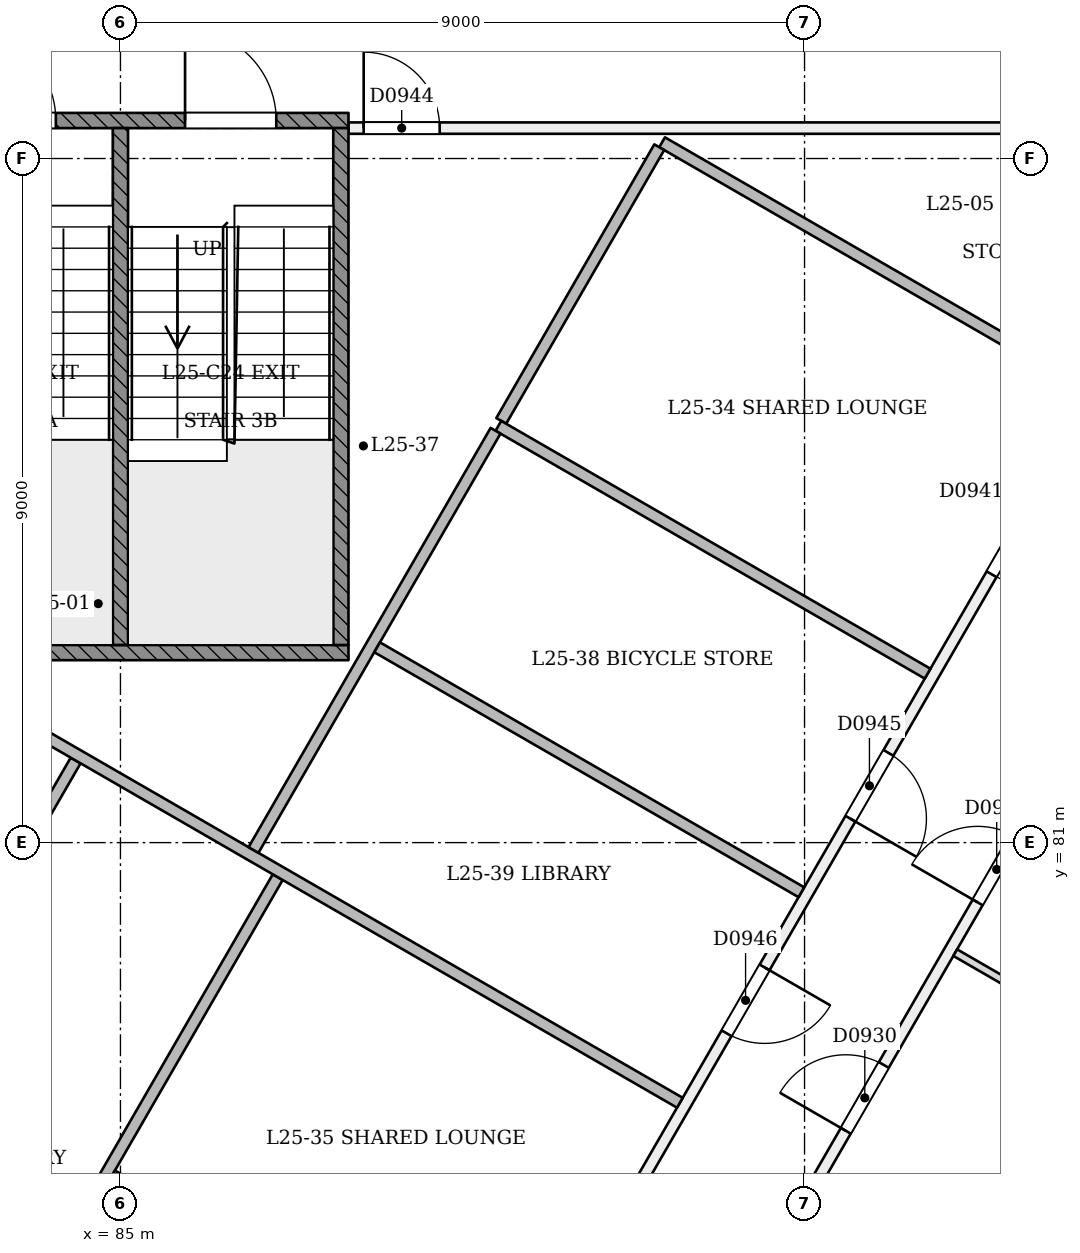
"""IFC4 building model, lengths in metres.
Left out: names, types, materials, properties, quantities, classifications, styles, units other than length and angle.
Written with IfcOpenShell. Run it as: python <this file> out.ifc"""

import sys

from ifc_helpers import new_model, si_unit, direction, frame, frame_2d, origin, place, context, subcontext, project, spatial, rectangle, extrude, element, fill, save


model = new_model("IFC4")
c1 = context("Model", 3, precision=1e-05, world=origin(), true_north=direction((0.0, 1.0)))
c2 = subcontext(c1, "Body", "Model", "MODEL_VIEW")
j1 = project(units=[si_unit("LENGTHUNIT", "METRE"), si_unit("PLANEANGLEUNIT", "RADIAN")], contexts=[c1])
p1 = place(None, origin())
s1 = spatial("IfcSite", under=j1, at=p1, CompositionType="ELEMENT")
p2 = place(p1, origin())
s2 = spatial("IfcBuilding", under=s1, at=p2, CompositionType="ELEMENT")
p3 = place(p2, frame((0.0, 0.0, 100.8)))
s3 = spatial("IfcBuildingStorey", under=s2, at=p3, CompositionType="ELEMENT", Elevation=100.8)
p4 = place(p3, frame((84.935, 64.793, 0.0), z_axis=(0.0, 0.0, 1.0), x_axis=(-0.500000245635, 0.866025261967, 0.0)))
e1 = element("IfcWall", 1, at=p4, inside=s3, PredefinedType="PARTITIONING", context=c2, shape_type="SweptSolid", body=[
    extrude(rectangle(XDim=29.568, YDim=0.15, at=frame_2d((14.784, 0.0))), origin(), (0.0, 0.0, 1.0), 3.1),
])
p5 = place(p4, frame((26.417, 0.0, 0.0)))
e2 = element("IfcOpeningElement", 2, at=p5, cuts=e1, PredefinedType="OPENING", context=c2, shape_type="SweptSolid", body=[
    extrude(rectangle(XDim=0.9, YDim=2.1, at=frame_2d((0.45, 1.05))), frame((0.0, 0.085, 0.0), z_axis=(0.0, -1.0, 0.0), x_axis=(1.0, 0.0, 0.0)), (0.0, 0.0, 1.0), 0.171),
])
p6 = place(p4, frame((5.658, 0.0, 0.0)))
e3 = element("IfcOpeningElement", 3, at=p6, cuts=e1, PredefinedType="OPENING", context=c2, shape_type="SweptSolid", body=[
    extrude(rectangle(XDim=1.0, YDim=2.1, at=frame_2d((0.5, 1.05))), frame((0.0, 0.085, 0.0), z_axis=(0.0, -1.0, 0.0), x_axis=(1.0, 0.0, 0.0)), (0.0, 0.0, 1.0), 0.171),
])
p7 = place(p4, frame((9.394, 0.0, 0.0)))
e4 = element("IfcOpeningElement", 4, at=p7, cuts=e1, PredefinedType="OPENING", context=c2, shape_type="SweptSolid", body=[
    extrude(rectangle(XDim=1.0, YDim=2.1, at=frame_2d((0.5, 1.05))), frame((0.0, 0.085, 0.0), z_axis=(0.0, -1.0, 0.0), x_axis=(1.0, 0.0, 0.0)), (0.0, 0.0, 1.0), 0.171),
])
p8 = place(p4, frame((17.694, 0.0, 0.0)))
e5 = element("IfcOpeningElement", 5, at=p8, cuts=e1, PredefinedType="OPENING", context=c2, shape_type="SweptSolid", body=[
    extrude(rectangle(XDim=1.0, YDim=2.1, at=frame_2d((0.5, 1.05))), frame((0.0, 0.085, 0.0), z_axis=(0.0, -1.0, 0.0), x_axis=(1.0, 0.0, 0.0)), (0.0, 0.0, 1.0), 0.171),
])
p9 = place(p4, frame((12.884, 0.0, 0.0)))
e6 = element("IfcOpeningElement", 6, at=p9, cuts=e1, PredefinedType="OPENING", context=c2, shape_type="SweptSolid", body=[
    extrude(rectangle(XDim=1.0, YDim=2.1, at=frame_2d((0.5, 1.05))), frame((0.0, 0.085, 0.0), z_axis=(0.0, -1.0, 0.0), x_axis=(1.0, 0.0, 0.0)), (0.0, 0.0, 1.0), 0.171),
])
p10 = place(p4, frame((22.366, 0.0, 0.0)))
e7 = element("IfcOpeningElement", 7, at=p10, cuts=e1, PredefinedType="OPENING", context=c2, shape_type="SweptSolid", body=[
    extrude(rectangle(XDim=1.0, YDim=2.1, at=frame_2d((0.5, 1.05))), frame((0.0, 0.085, 0.0), z_axis=(0.0, -1.0, 0.0), x_axis=(1.0, 0.0, 0.0)), (0.0, 0.0, 1.0), 0.171),
])
p11 = place(p3, frame((88.0, 90.4, 0.0), z_axis=(0.0, 0.0, 1.0), x_axis=(1.0, 0.0, 0.0)))
e8 = element("IfcWall", 8, at=p11, inside=s3, PredefinedType="PARTITIONING", context=c2, shape_type="SweptSolid", body=[
    extrude(rectangle(XDim=11.719, YDim=0.15, at=frame_2d((5.86, 0.0))), origin(), (0.0, 0.0, 1.0), 3.1),
])
p12 = place(p11, frame((0.2, 0.0, 0.0)))
e9 = element("IfcOpeningElement", 9, at=p12, cuts=e8, PredefinedType="OPENING", context=c2, shape_type="SweptSolid", body=[
    extrude(rectangle(XDim=1.0, YDim=2.1, at=frame_2d((0.5, 1.05))), frame((0.0, 0.085, 0.0), z_axis=(0.0, -1.0, 0.0), x_axis=(1.0, 0.0, 0.0)), (0.0, 0.0, 1.0), 0.171),
])
p13 = place(p3, frame((63.623, 97.706, 0.0), z_axis=(0.0, 0.0, 1.0), x_axis=(0.500000781663, -0.866024952491, 0.0)))
e10 = element("IfcWall", 10, at=p13, inside=s3, PredefinedType="PARTITIONING", context=c2, shape_type="SweptSolid", body=[
    extrude(rectangle(XDim=41.837, YDim=0.15, at=frame_2d((20.919, 0.0))), origin(), (0.0, 0.0, 1.0), 2.7),
])
p14 = place(p13, frame((2.912, 0.0, 0.0)))
e11 = element("IfcOpeningElement", 11, at=p14, cuts=e10, PredefinedType="OPENING", context=c2, shape_type="SweptSolid", body=[
    extrude(rectangle(XDim=1.2, YDim=2.1, at=frame_2d((0.6, 1.05))), frame((0.0, 0.085, 0.0), z_axis=(0.0, -1.0, 0.0), x_axis=(1.0, 0.0, 0.0)), (0.0, 0.0, 1.0), 0.171),
])
p15 = place(p13, frame((10.198, 0.0, 0.0)))
e12 = element("IfcOpeningElement", 12, at=p15, cuts=e10, PredefinedType="OPENING", context=c2, shape_type="SweptSolid", body=[
    extrude(rectangle(XDim=1.0, YDim=2.1, at=frame_2d((0.5, 1.05))), frame((0.0, 0.085, 0.0), z_axis=(0.0, -1.0, 0.0), x_axis=(1.0, 0.0, 0.0)), (0.0, 0.0, 1.0), 0.171),
])
p16 = place(p13, frame((12.523, 0.0, 0.0)))
e13 = element("IfcOpeningElement", 13, at=p16, cuts=e10, PredefinedType="OPENING", context=c2, shape_type="SweptSolid", body=[
    extrude(rectangle(XDim=1.0, YDim=2.1, at=frame_2d((0.5, 1.05))), frame((0.0, 0.085, 0.0), z_axis=(0.0, -1.0, 0.0), x_axis=(1.0, 0.0, 0.0)), (0.0, 0.0, 1.0), 0.171),
])
p17 = place(p13, frame((19.314, 0.0, 0.0)))
e14 = element("IfcOpeningElement", 14, at=p17, cuts=e10, PredefinedType="OPENING", context=c2, shape_type="SweptSolid", body=[
    extrude(rectangle(XDim=1.0, YDim=2.1, at=frame_2d((0.5, 1.05))), frame((0.0, 0.085, 0.0), z_axis=(0.0, -1.0, 0.0), x_axis=(1.0, 0.0, 0.0)), (0.0, 0.0, 1.0), 0.171),
])
p18 = place(p13, frame((21.639, 0.0, 0.0)))
e15 = element("IfcOpeningElement", 15, at=p18, cuts=e10, PredefinedType="OPENING", context=c2, shape_type="SweptSolid", body=[
    extrude(rectangle(XDim=1.0, YDim=2.1, at=frame_2d((0.5, 1.05))), frame((0.0, 0.085, 0.0), z_axis=(0.0, -1.0, 0.0), x_axis=(1.0, 0.0, 0.0)), (0.0, 0.0, 1.0), 0.171),
])
p19 = place(p13, frame((27.169, 0.0, 0.0)))
e16 = element("IfcOpeningElement", 16, at=p19, cuts=e10, PredefinedType="OPENING", context=c2, shape_type="SweptSolid", body=[
    extrude(rectangle(XDim=1.0, YDim=2.1, at=frame_2d((0.5, 1.05))), frame((0.0, 0.085, 0.0), z_axis=(0.0, -1.0, 0.0), x_axis=(1.0, 0.0, 0.0)), (0.0, 0.0, 1.0), 0.171),
])
p20 = place(p13, frame((30.523, 0.0, 0.0)))
e17 = element("IfcOpeningElement", 17, at=p20, cuts=e10, PredefinedType="OPENING", context=c2, shape_type="SweptSolid", body=[
    extrude(rectangle(XDim=1.0, YDim=2.1, at=frame_2d((0.5, 1.05))), frame((0.0, 0.085, 0.0), z_axis=(0.0, -1.0, 0.0), x_axis=(1.0, 0.0, 0.0)), (0.0, 0.0, 1.0), 0.171),
])
p21 = place(p13, frame((37.725, 0.0, 0.0)))
e18 = element("IfcOpeningElement", 18, at=p21, cuts=e10, PredefinedType="OPENING", context=c2, shape_type="SweptSolid", body=[
    extrude(rectangle(XDim=1.2, YDim=2.1, at=frame_2d((0.6, 1.05))), frame((0.0, 0.085, 0.0), z_axis=(0.0, -1.0, 0.0), x_axis=(1.0, 0.0, 0.0)), (0.0, 0.0, 1.0), 0.171),
])
p22 = place(p3, frame((85.458, 61.474, 0.0), z_axis=(0.0, 0.0, 1.0), x_axis=(0.500000781663, 0.866024952491, 0.0)))
e19 = element("IfcWall", 19, at=p22, inside=s3, PredefinedType="PARTITIONING", context=c2, shape_type="SweptSolid", body=[
    extrude(rectangle(XDim=41.837, YDim=0.15, at=frame_2d((20.919, 0.0))), origin(), (0.0, 0.0, 1.0), 2.7),
])
p23 = place(p22, frame((0.253, 0.0, 0.0)))
e20 = element("IfcOpeningElement", 20, at=p23, cuts=e19, PredefinedType="OPENING", context=c2, shape_type="SweptSolid", body=[
    extrude(rectangle(XDim=1.2, YDim=2.1, at=frame_2d((0.6, 1.05))), frame((0.0, 0.085, 0.0), z_axis=(0.0, -1.0, 0.0), x_axis=(1.0, 0.0, 0.0)), (0.0, 0.0, 1.0), 0.171),
])
p24 = place(p22, frame((5.719, 0.0, 0.0)))
e21 = element("IfcOpeningElement", 21, at=p24, cuts=e19, PredefinedType="OPENING", context=c2, shape_type="SweptSolid", body=[
    extrude(rectangle(XDim=1.2, YDim=2.1, at=frame_2d((0.6, 1.05))), frame((0.0, 0.085, 0.0), z_axis=(0.0, -1.0, 0.0), x_axis=(1.0, 0.0, 0.0)), (0.0, 0.0, 1.0), 0.171),
])
p25 = place(p22, frame((13.669, 0.0, 0.0)))
e22 = element("IfcOpeningElement", 22, at=p25, cuts=e19, PredefinedType="OPENING", context=c2, shape_type="SweptSolid", body=[
    extrude(rectangle(XDim=1.0, YDim=2.1, at=frame_2d((0.5, 1.05))), frame((0.0, 0.085, 0.0), z_axis=(0.0, -1.0, 0.0), x_axis=(1.0, 0.0, 0.0)), (0.0, 0.0, 1.0), 0.171),
])
p26 = place(p22, frame((18.169, 0.0, 0.0)))
e23 = element("IfcOpeningElement", 23, at=p26, cuts=e19, PredefinedType="OPENING", context=c2, shape_type="SweptSolid", body=[
    extrude(rectangle(XDim=1.0, YDim=2.1, at=frame_2d((0.5, 1.05))), frame((0.0, 0.085, 0.0), z_axis=(0.0, -1.0, 0.0), x_axis=(1.0, 0.0, 0.0)), (0.0, 0.0, 1.0), 0.171),
])
p27 = place(p22, frame((21.639, 0.0, 0.0)))
e24 = element("IfcOpeningElement", 24, at=p27, cuts=e19, PredefinedType="OPENING", context=c2, shape_type="SweptSolid", body=[
    extrude(rectangle(XDim=1.0, YDim=2.1, at=frame_2d((0.5, 1.05))), frame((0.0, 0.085, 0.0), z_axis=(0.0, -1.0, 0.0), x_axis=(1.0, 0.0, 0.0)), (0.0, 0.0, 1.0), 0.171),
])
p28 = place(p22, frame((27.169, 0.0, 0.0)))
e25 = element("IfcOpeningElement", 25, at=p28, cuts=e19, PredefinedType="OPENING", context=c2, shape_type="SweptSolid", body=[
    extrude(rectangle(XDim=1.0, YDim=2.1, at=frame_2d((0.5, 1.05))), frame((0.0, 0.085, 0.0), z_axis=(0.0, -1.0, 0.0), x_axis=(1.0, 0.0, 0.0)), (0.0, 0.0, 1.0), 0.171),
])
p29 = place(p22, frame((30.639, 0.0, 0.0)))
e26 = element("IfcOpeningElement", 26, at=p29, cuts=e19, PredefinedType="OPENING", context=c2, shape_type="SweptSolid", body=[
    extrude(rectangle(XDim=1.0, YDim=2.1, at=frame_2d((0.5, 1.05))), frame((0.0, 0.085, 0.0), z_axis=(0.0, -1.0, 0.0), x_axis=(1.0, 0.0, 0.0)), (0.0, 0.0, 1.0), 0.171),
])
p30 = place(p22, frame((37.71, 0.0, 0.0)))
e27 = element("IfcOpeningElement", 27, at=p30, cuts=e19, PredefinedType="OPENING", context=c2, shape_type="SweptSolid", body=[
    extrude(rectangle(XDim=1.2, YDim=2.1, at=frame_2d((0.6, 1.05))), frame((0.0, 0.085, 0.0), z_axis=(0.0, -1.0, 0.0), x_axis=(1.0, 0.0, 0.0)), (0.0, 0.0, 1.0), 0.171),
])
p31 = place(p3, frame((99.849, 90.4, 0.0), z_axis=(0.0, 0.0, 1.0), x_axis=(-0.499999267484, -0.866025826702, 0.0)))
e28 = element("IfcWall", 28, at=p31, inside=s3, PredefinedType="PARTITIONING", context=c2, shape_type="SweptSolid", body=[
    extrude(rectangle(XDim=29.698, YDim=0.15, at=frame_2d((14.849, 0.0))), origin(), (0.0, 0.0, 1.0), 3.1),
])
p32 = place(p31, frame((2.178, 0.0, 0.0)))
e29 = element("IfcOpeningElement", 29, at=p32, cuts=e28, PredefinedType="OPENING", context=c2, shape_type="SweptSolid", body=[
    extrude(rectangle(XDim=1.0, YDim=2.1, at=frame_2d((0.5, 1.05))), frame((0.0, 0.085, 0.0), z_axis=(0.0, -1.0, 0.0), x_axis=(1.0, 0.0, 0.0)), (0.0, 0.0, 1.0), 0.171),
])
p33 = place(p31, frame((5.577, 0.0, 0.0)))
e30 = element("IfcOpeningElement", 30, at=p33, cuts=e28, PredefinedType="OPENING", context=c2, shape_type="SweptSolid", body=[
    extrude(rectangle(XDim=1.2, YDim=2.1, at=frame_2d((0.6, 1.05))), frame((0.0, 0.085, 0.0), z_axis=(0.0, -1.0, 0.0), x_axis=(1.0, 0.0, 0.0)), (0.0, 0.0, 1.0), 0.171),
])
p34 = place(p31, frame((16.531, 0.0, 0.0)))
e31 = element("IfcOpeningElement", 31, at=p34, cuts=e28, PredefinedType="OPENING", context=c2, shape_type="SweptSolid", body=[
    extrude(rectangle(XDim=1.2, YDim=2.1, at=frame_2d((0.6, 1.05))), frame((0.0, 0.085, 0.0), z_axis=(0.0, -1.0, 0.0), x_axis=(1.0, 0.0, 0.0)), (0.0, 0.0, 1.0), 0.171),
])
p35 = place(p31, frame((9.491, 0.0, 0.0)))
e32 = element("IfcOpeningElement", 32, at=p35, cuts=e28, PredefinedType="OPENING", context=c2, shape_type="SweptSolid", body=[
    extrude(rectangle(XDim=1.0, YDim=2.1, at=frame_2d((0.5, 1.05))), frame((0.0, 0.085, 0.0), z_axis=(0.0, -1.0, 0.0), x_axis=(1.0, 0.0, 0.0)), (0.0, 0.0, 1.0), 0.171),
])
p36 = place(p31, frame((12.75, 0.0, 0.0)))
e33 = element("IfcOpeningElement", 33, at=p36, cuts=e28, PredefinedType="OPENING", context=c2, shape_type="SweptSolid", body=[
    extrude(rectangle(XDim=1.0, YDim=2.1, at=frame_2d((0.5, 1.05))), frame((0.0, 0.085, 0.0), z_axis=(0.0, -1.0, 0.0), x_axis=(1.0, 0.0, 0.0)), (0.0, 0.0, 1.0), 0.171),
])
p37 = place(p31, frame((20.574, 0.0, 0.0)))
e34 = element("IfcOpeningElement", 34, at=p37, cuts=e28, PredefinedType="OPENING", context=c2, shape_type="SweptSolid", body=[
    extrude(rectangle(XDim=1.0, YDim=2.1, at=frame_2d((0.5, 1.05))), frame((0.0, 0.085, 0.0), z_axis=(0.0, -1.0, 0.0), x_axis=(1.0, 0.0, 0.0)), (0.0, 0.0, 1.0), 0.171),
])
p38 = place(p31, frame((25.296, 0.0, 0.0)))
e35 = element("IfcOpeningElement", 35, at=p38, cuts=e28, PredefinedType="OPENING", context=c2, shape_type="SweptSolid", body=[
    extrude(rectangle(XDim=1.0, YDim=2.1, at=frame_2d((0.5, 1.05))), frame((0.0, 0.085, 0.0), z_axis=(0.0, -1.0, 0.0), x_axis=(1.0, 0.0, 0.0)), (0.0, 0.0, 1.0), 0.171),
])
p39 = place(p3, frame((92.126, 90.214, 0.0), z_axis=(0.0, 0.0, 1.0), x_axis=(0.866024706996, -0.500001206871, 0.0)))
e36 = element("IfcWall", 36, at=p39, inside=s3, PredefinedType="PARTITIONING", context=c2, shape_type="SweptSolid", body=[
    extrude(rectangle(XDim=6.52, YDim=0.15, at=frame_2d((3.26, 0.0))), origin(), (0.0, 0.0, 1.0), 3.1),
])
p40 = place(p3, frame((101.478, 76.38, 0.0), z_axis=(0.0, 0.0, 1.0), x_axis=(-0.866025401434, 0.500000004071, 0.0)))
e37 = element("IfcWall", 37, at=p40, inside=s3, PredefinedType="PARTITIONING", context=c2, shape_type="SweptSolid", body=[
    extrude(rectangle(XDim=6.345, YDim=0.1, at=frame_2d((3.173, 0.0))), origin(), (0.0, 0.0, 1.0), 2.6),
])
p41 = place(p3, frame((83.163, 73.78, 0.0), z_axis=(0.0, 0.0, 1.0), x_axis=(0.500011000363, 0.866019052629, 0.0)))
e38 = element("IfcWall", 38, at=p41, inside=s3, PredefinedType="PARTITIONING", context=c2, shape_type="SweptSolid", body=[
    extrude(rectangle(XDim=7.812, YDim=0.15, at=frame_2d((3.906, 0.0))), origin(), (0.0, 0.0, 1.0), 3.1),
])
p42 = place(p3, frame((84.41, 82.081, 0.0), z_axis=(0.0, 0.0, 1.0), x_axis=(-0.500010229568, -0.86601949766, 0.0)))
e39 = element("IfcWall", 39, at=p42, inside=s3, PredefinedType="PARTITIONING", context=c2, shape_type="SweptSolid", body=[
    extrude(rectangle(XDim=9.326, YDim=0.15, at=frame_2d((4.663, 0.0))), origin(), (0.0, 0.0, 1.0), 3.1),
])
p43 = place(p3, frame((92.089, 90.149, 0.0), z_axis=(0.0, 0.0, 1.0), x_axis=(-0.500010491815, -0.866019346247, 0.0)))
e40 = element("IfcWall", 40, at=p43, inside=s3, PredefinedType="PARTITIONING", context=c2, shape_type="SweptSolid", body=[
    extrude(rectangle(XDim=4.158, YDim=0.15, at=frame_2d((2.079, 0.0))), origin(), (0.0, 0.0, 1.0), 3.1),
])
p44 = place(p3, frame((89.972, 86.483, 0.0), z_axis=(0.0, 0.0, 1.0), x_axis=(0.866024706996, -0.500001206871, 0.0)))
e41 = element("IfcWall", 41, at=p44, inside=s3, PredefinedType="PARTITIONING", context=c2, shape_type="SweptSolid", body=[
    extrude(rectangle(XDim=6.52, YDim=0.15, at=frame_2d((3.26, 0.0))), origin(), (0.0, 0.0, 1.0), 3.1),
])
p45 = place(p3, frame((92.36, 77.578, 0.0), z_axis=(0.0, 0.0, 1.0), x_axis=(-0.866025678131, 0.499999524817, 0.0)))
e42 = element("IfcWall", 42, at=p45, inside=s3, PredefinedType="PARTITIONING", context=c2, shape_type="SweptSolid", body=[
    extrude(rectangle(XDim=11.645, YDim=0.15, at=frame_2d((5.822, 0.0))), origin(), (0.0, 0.0, 1.0), 3.1),
])
p46 = place(p3, frame((84.89, 76.622, 0.0), z_axis=(0.0, 0.0, 1.0), x_axis=(0.866030178321, -0.499991730169, 0.0)))
e43 = element("IfcWall", 43, at=p46, inside=s3, PredefinedType="PARTITIONING", context=c2, shape_type="SweptSolid", body=[
    extrude(rectangle(XDim=5.991, YDim=0.15, at=frame_2d((2.995, 0.0))), origin(), (0.0, 0.0, 1.0), 3.1),
])
p47 = place(p3, frame((86.75, 80.903, 0.0), z_axis=(0.0, 0.0, 1.0), x_axis=(0.500002302069, 0.86602407468, 0.0)))
e44 = element("IfcWall", 44, at=p47, inside=s3, PredefinedType="PARTITIONING", context=c2, shape_type="SweptSolid", body=[
    extrude(rectangle(XDim=6.369, YDim=0.15, at=frame_2d((3.184, 0.0))), origin(), (0.0, 0.0, 1.0), 3.1),
])
p48 = place(p3, frame((88.377, 83.57, 0.0), z_axis=(0.0, 0.0, 1.0), x_axis=(0.866015264425, -0.500017561474, 0.0)))
e45 = element("IfcWall", 45, at=p48, inside=s3, PredefinedType="PARTITIONING", context=c2, shape_type="SweptSolid", body=[
    extrude(rectangle(XDim=6.445, YDim=0.15, at=frame_2d((3.223, 0.0))), origin(), (0.0, 0.0, 1.0), 3.1),
])
p49 = place(p3, frame((82.0, 90.5, 0.0), z_axis=(0.0, 0.0, 1.0), x_axis=(1.0, 0.0, 0.0)))
e46 = element("IfcWall", 46, at=p49, inside=s3, PredefinedType="SOLIDWALL", context=c2, shape_type="SweptSolid", body=[
    extrude(rectangle(XDim=6.0, YDim=0.2, at=frame_2d((3.0, 0.0))), origin(), (0.0, 0.0, 1.0), 3.1),
])
p50 = place(p49, frame((0.95, 0.0, 0.0)))
e47 = element("IfcOpeningElement", 47, at=p50, cuts=e46, PredefinedType="OPENING", context=c2, shape_type="SweptSolid", body=[
    extrude(rectangle(XDim=1.2, YDim=2.1, at=frame_2d((0.6, 1.05))), frame((0.0, 0.11, 0.0), z_axis=(0.0, -1.0, 0.0), x_axis=(1.0, 0.0, 0.0)), (0.0, 0.0, 1.0), 0.221),
])
p51 = place(p49, frame((3.85, 0.0, 0.0)))
e48 = element("IfcOpeningElement", 48, at=p51, cuts=e46, PredefinedType="OPENING", context=c2, shape_type="SweptSolid", body=[
    extrude(rectangle(XDim=1.2, YDim=2.1, at=frame_2d((0.6, 1.05))), frame((0.0, 0.11, 0.0), z_axis=(0.0, -1.0, 0.0), x_axis=(1.0, 0.0, 0.0)), (0.0, 0.0, 1.0), 0.221),
])
p52 = place(p3, frame((82.0, 83.5, 0.0), z_axis=(0.0, 0.0, 1.0), x_axis=(1.0, 0.0, 0.0)))
e49 = element("IfcWall", 49, at=p52, inside=s3, PredefinedType="SOLIDWALL", context=c2, shape_type="SweptSolid", body=[
    extrude(rectangle(XDim=6.0, YDim=0.2, at=frame_2d((3.0, 0.0))), origin(), (0.0, 0.0, 1.0), 3.1),
])
for number, where, z_axis, x_axis in (
    (50, (87.9, 83.6, 0.0), (0.0, 0.0, 1.0), (0.0, 1.0, 0.0)),
    (51, (85.0, 83.6, 0.0), (0.0, 0.0, 1.0), (0.0, 1.0, 0.0)),
):
    element("IfcWall", number, at=place(p3, frame(where, z_axis=z_axis, x_axis=x_axis)), inside=s3, PredefinedType="SOLIDWALL", context=c2, shape_type="SweptSolid", body=[
        extrude(rectangle(XDim=6.8, YDim=0.2, at=frame_2d((3.4, 0.0))), origin(), (0.0, 0.0, 1.0), 3.1),
    ])
p53 = place(p26, origin())
e52 = element("IfcDoor", 52, at=p53, inside=s3, OperationType="SINGLE_SWING_LEFT", PredefinedType="NOTDEFINED", context=c2, shape_type="SweptSolid", body=[
    extrude(rectangle(XDim=1.0, YDim=2.1, at=frame_2d((0.5, 1.05))), frame((0.0, 0.025, 0.0), z_axis=(0.0, -1.0, 0.0), x_axis=(1.0, 0.0, 0.0)), (0.0, 0.0, 1.0), 0.05),
])
fill(e23, e52)
p54 = place(p27, origin())
e53 = element("IfcDoor", 53, at=p54, inside=s3, OperationType="SINGLE_SWING_LEFT", PredefinedType="NOTDEFINED", context=c2, shape_type="SweptSolid", body=[
    extrude(rectangle(XDim=1.0, YDim=2.1, at=frame_2d((0.5, 1.05))), frame((0.0, 0.025, 0.0), z_axis=(0.0, -1.0, 0.0), x_axis=(1.0, 0.0, 0.0)), (0.0, 0.0, 1.0), 0.05),
])
fill(e24, e53)
p55 = place(p33, origin())
e54 = element("IfcDoor", 54, at=p55, inside=s3, OperationType="SINGLE_SWING_LEFT", PredefinedType="NOTDEFINED", context=c2, shape_type="SweptSolid", body=[
    extrude(rectangle(XDim=1.2, YDim=2.1, at=frame_2d((0.6, 1.05))), frame((0.0, 0.025, 0.0), z_axis=(0.0, -1.0, 0.0), x_axis=(1.0, 0.0, 0.0)), (0.0, 0.0, 1.0), 0.05),
])
fill(e30, e54)
p56 = place(p12, origin())
e55 = element("IfcDoor", 55, at=p56, inside=s3, OperationType="SINGLE_SWING_LEFT", PredefinedType="NOTDEFINED", context=c2, shape_type="SweptSolid", body=[
    extrude(rectangle(XDim=1.0, YDim=2.1, at=frame_2d((0.5, 1.05))), frame((0.0, 0.025, 0.0), z_axis=(0.0, -1.0, 0.0), x_axis=(1.0, 0.0, 0.0)), (0.0, 0.0, 1.0), 0.05),
])
fill(e9, e55)
p57 = place(p35, origin())
e56 = element("IfcDoor", 56, at=p57, inside=s3, OperationType="SINGLE_SWING_RIGHT", PredefinedType="NOTDEFINED", context=c2, shape_type="SweptSolid", body=[
    extrude(rectangle(XDim=1.0, YDim=2.1, at=frame_2d((0.5, 1.05))), frame((0.0, 0.025, 0.0), z_axis=(0.0, -1.0, 0.0), x_axis=(1.0, 0.0, 0.0)), (0.0, 0.0, 1.0), 0.05),
])
fill(e32, e56)
p58 = place(p36, origin())
e57 = element("IfcDoor", 57, at=p58, inside=s3, OperationType="SINGLE_SWING_LEFT", PredefinedType="NOTDEFINED", context=c2, shape_type="SweptSolid", body=[
    extrude(rectangle(XDim=1.0, YDim=2.1, at=frame_2d((0.5, 1.05))), frame((0.0, 0.025, 0.0), z_axis=(0.0, -1.0, 0.0), x_axis=(1.0, 0.0, 0.0)), (0.0, 0.0, 1.0), 0.05),
])
fill(e33, e57)
p59 = place(p50, origin())
e58 = element("IfcDoor", 58, at=p59, inside=s3, OperationType="SINGLE_SWING_LEFT", PredefinedType="NOTDEFINED", context=c2, shape_type="SweptSolid", body=[
    extrude(rectangle(XDim=1.2, YDim=2.1, at=frame_2d((0.6, 1.05))), frame((0.0, 0.025, 0.0), z_axis=(0.0, -1.0, 0.0), x_axis=(1.0, 0.0, 0.0)), (0.0, 0.0, 1.0), 0.05),
])
fill(e47, e58)
p60 = place(p51, origin())
e59 = element("IfcDoor", 59, at=p60, inside=s3, OperationType="SINGLE_SWING_LEFT", PredefinedType="NOTDEFINED", context=c2, shape_type="SweptSolid", body=[
    extrude(rectangle(XDim=1.2, YDim=2.1, at=frame_2d((0.6, 1.05))), frame((0.0, 0.025, 0.0), z_axis=(0.0, -1.0, 0.0), x_axis=(1.0, 0.0, 0.0)), (0.0, 0.0, 1.0), 0.05),
])
fill(e48, e59)
save(model, sys.argv[1])
